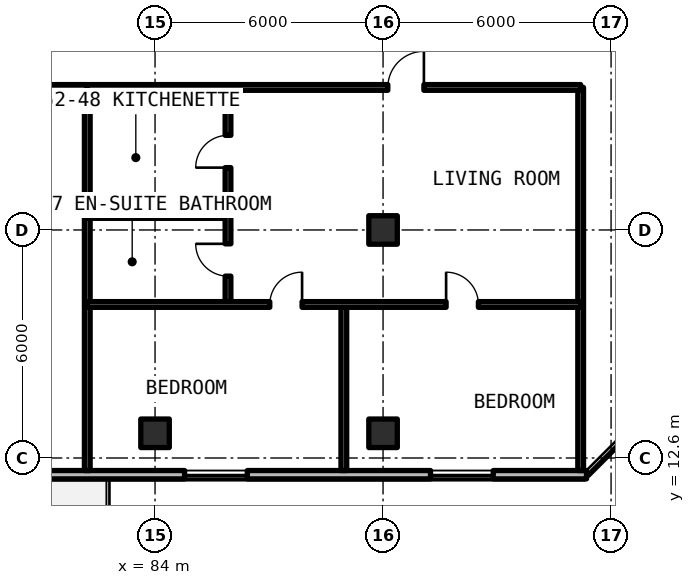
"""IFC4 building model, lengths in metres.
Left out: names, types, materials, properties, quantities, classifications, styles, units other than length and angle.
Written with IfcOpenShell. Run it as: python <this file> out.ifc"""

import sys

from ifc_helpers import new_model, si_unit, direction, frame, frame_2d, origin, origin_2d, place, context, subcontext, project, spatial, rectangle, extrude, element, fill, save


model = new_model("IFC4")
c1 = context("Model", 3, precision=1e-05, world=origin(), true_north=direction((0.0, 1.0)))
c2 = subcontext(c1, "Body", "Model", "MODEL_VIEW")
j1 = project(units=[si_unit("LENGTHUNIT", "METRE"), si_unit("PLANEANGLEUNIT", "RADIAN")], contexts=[c1])
p1 = place(None, origin())
s1 = spatial("IfcSite", under=j1, at=p1, CompositionType="ELEMENT")
p2 = place(p1, origin())
s2 = spatial("IfcBuilding", under=s1, at=p2, CompositionType="ELEMENT")
p3 = place(p2, frame((0.0, 0.0, 222.75)))
s3 = spatial("IfcBuildingStorey", under=s2, at=p3, CompositionType="ELEMENT", Elevation=222.75)
for number, where, z_axis, x_axis in (
    (1, (90.0, 18.6, 0.0), (0.0, 0.0, 1.0), (1.0, 0.0, 0.0)),
    (2, (84.0, 13.25, 0.0), (0.0, 0.0, 1.0), (1.0, 0.0, 0.0)),
    (3, (90.0, 13.25, 0.0), (0.0, 0.0, 1.0), (1.0, 0.0, 0.0)),
):
    element("IfcColumn", number, at=place(p3, frame(where, z_axis=z_axis, x_axis=x_axis)), inside=s3, PredefinedType="COLUMN", context=c2, shape_type="SweptSolid", body=[
        extrude(rectangle(XDim=0.75, YDim=0.75, at=origin_2d()), origin(), (0.0, 0.0, 1.0), 3.3),
    ])
p4 = place(p3, frame((52.11, 12.16, 0.0), z_axis=(0.0, 0.0, 1.0), x_axis=(1.0, 0.0, 0.0)))
e4 = element("IfcWall", 4, at=p4, inside=s3, PredefinedType="SOLIDWALL", context=c2, shape_type="SweptSolid", body=[
    extrude(rectangle(XDim=43.244, YDim=0.22, at=frame_2d((21.622, 0.0))), origin(), (0.0, 0.0, 1.0), 3.08),
])
p5 = place(p4, frame((15.69, 0.0, 0.0)))
e5 = element("IfcOpeningElement", 5, at=p5, cuts=e4, PredefinedType="OPENING", context=c2, shape_type="SweptSolid", body=[
    extrude(rectangle(XDim=1.1, YDim=2.15, at=frame_2d((0.55, 1.075))), frame((0.0, 0.12, 0.0), z_axis=(0.0, -1.0, 0.0), x_axis=(1.0, 0.0, 0.0)), (0.0, 0.0, 1.0), 0.24),
])
p6 = place(p4, frame((27.79, 0.0, 0.0)))
e6 = element("IfcOpeningElement", 6, at=p6, cuts=e4, PredefinedType="OPENING", context=c2, shape_type="SweptSolid", body=[
    extrude(rectangle(XDim=1.1, YDim=2.15, at=frame_2d((0.55, 1.075))), frame((0.0, 0.12, 0.0), z_axis=(0.0, -1.0, 0.0), x_axis=(1.0, 0.0, 0.0)), (0.0, 0.0, 1.0), 0.24),
])
p7 = place(p4, frame((2.726, 0.0, 0.78)))
e7 = element("IfcOpeningElement", 7, at=p7, cuts=e4, PredefinedType="OPENING", context=c2, shape_type="SweptSolid", body=[
    extrude(rectangle(XDim=1.65, YDim=1.66, at=frame_2d((0.825, 0.83))), frame((0.0, 0.12, 0.0), z_axis=(0.0, -1.0, 0.0), x_axis=(1.0, 0.0, 0.0)), (0.0, 0.0, 1.0), 0.24),
])
p8 = place(p4, frame((9.652, 0.0, 0.78)))
e8 = element("IfcOpeningElement", 8, at=p8, cuts=e4, PredefinedType="OPENING", context=c2, shape_type="SweptSolid", body=[
    extrude(rectangle(XDim=1.65, YDim=1.66, at=frame_2d((0.825, 0.83))), frame((0.0, 0.12, 0.0), z_axis=(0.0, -1.0, 0.0), x_axis=(1.0, 0.0, 0.0)), (0.0, 0.0, 1.0), 0.24),
])
p9 = place(p4, frame((32.667, 0.0, 0.78)))
e9 = element("IfcOpeningElement", 9, at=p9, cuts=e4, PredefinedType="OPENING", context=c2, shape_type="SweptSolid", body=[
    extrude(rectangle(XDim=1.65, YDim=1.66, at=frame_2d((0.825, 0.83))), frame((0.0, 0.12, 0.0), z_axis=(0.0, -1.0, 0.0), x_axis=(1.0, 0.0, 0.0)), (0.0, 0.0, 1.0), 0.24),
])
p10 = place(p4, frame((39.139, 0.0, 0.78)))
e10 = element("IfcOpeningElement", 10, at=p10, cuts=e4, PredefinedType="OPENING", context=c2, shape_type="SweptSolid", body=[
    extrude(rectangle(XDim=1.65, YDim=1.66, at=frame_2d((0.825, 0.83))), frame((0.0, 0.12, 0.0), z_axis=(0.0, -1.0, 0.0), x_axis=(1.0, 0.0, 0.0)), (0.0, 0.0, 1.0), 0.24),
])
for number, where, z_axis, x_axis in (
    (11, (95.2, 12.27, 0.0), (0.0, 0.0, 1.0), (0.0, 1.0, 0.0)),
    (12, (82.217, 12.27, 0.0), (0.0, 0.0, 1.0), (0.0, 1.0, 0.0)),
):
    element("IfcWall", number, at=place(p3, frame(where, z_axis=z_axis, x_axis=x_axis)), inside=s3, PredefinedType="SOLIDWALL", context=c2, shape_type="SweptSolid", body=[
        extrude(rectangle(XDim=10.08, YDim=0.15, at=frame_2d((5.04, 0.0))), origin(), (0.0, 0.0, 1.0), 2.35),
    ])
p11 = place(p3, frame((72.185, 22.35, 0.0), z_axis=(0.0, 0.0, 1.0), x_axis=(1.0, 0.0, 0.0)))
e13 = element("IfcWall", 13, at=p11, inside=s3, PredefinedType="SOLIDWALL", context=c2, shape_type="SweptSolid", body=[
    extrude(rectangle(XDim=10.032, YDim=0.15, at=frame_2d((5.016, 0.0))), origin(), (0.0, 0.0, 1.0), 2.35),
])
p12 = place(p11, frame((4.466, 0.0, 0.0)))
e14 = element("IfcOpeningElement", 14, at=p12, cuts=e13, PredefinedType="OPENING", context=c2, shape_type="SweptSolid", body=[
    extrude(rectangle(XDim=1.1, YDim=2.15, at=frame_2d((0.55, 1.075))), frame((0.0, 0.085, 0.0), z_axis=(0.0, -1.0, 0.0), x_axis=(1.0, 0.0, 0.0)), (0.0, 0.0, 1.0), 0.17),
])
p13 = place(p3, frame((82.217, 18.981, 0.0), z_axis=(0.0, 0.0, 1.0), x_axis=(1.0, 0.0, 0.0)))
e15 = element("IfcWall", 15, at=p13, inside=s3, PredefinedType="PARTITIONING", context=c2, shape_type="SweptSolid", body=[
    extrude(rectangle(XDim=3.703, YDim=0.15, at=frame_2d((1.852, 0.0))), origin(), (0.0, 0.0, 1.0), 2.35),
])
p14 = place(p3, frame((85.92, 16.64, 0.0), z_axis=(0.0, 0.0, 1.0), x_axis=(0.0, 1.0, 0.0)))
e16 = element("IfcWall", 16, at=p14, inside=s3, PredefinedType="PARTITIONING", context=c2, shape_type="SweptSolid", body=[
    extrude(rectangle(XDim=5.71, YDim=0.15, at=frame_2d((2.855, 0.0))), origin(), (0.0, 0.0, 1.0), 2.35),
])
p15 = place(p14, frame((0.746, 0.0, 0.0)))
e17 = element("IfcOpeningElement", 17, at=p15, cuts=e16, PredefinedType="OPENING", context=c2, shape_type="SweptSolid", body=[
    extrude(rectangle(XDim=0.85, YDim=2.1, at=frame_2d((0.425, 1.05))), frame((0.0, 0.085, 0.0), z_axis=(0.0, -1.0, 0.0), x_axis=(1.0, 0.0, 0.0)), (0.0, 0.0, 1.0), 0.17),
])
p16 = place(p14, frame((3.601, 0.0, 0.0)))
e18 = element("IfcOpeningElement", 18, at=p16, cuts=e16, PredefinedType="OPENING", context=c2, shape_type="SweptSolid", body=[
    extrude(rectangle(XDim=0.85, YDim=2.1, at=frame_2d((0.425, 1.05))), frame((0.0, 0.085, 0.0), z_axis=(0.0, -1.0, 0.0), x_axis=(1.0, 0.0, 0.0)), (0.0, 0.0, 1.0), 0.17),
])
p17 = place(p3, frame((88.968, 12.27, 0.0), z_axis=(0.0, 0.0, 1.0), x_axis=(0.0, 1.0, 0.0)))
e19 = element("IfcWall", 19, at=p17, inside=s3, PredefinedType="PARTITIONING", context=c2, shape_type="SweptSolid", body=[
    extrude(rectangle(XDim=4.37, YDim=0.15, at=frame_2d((2.185, 0.0))), origin(), (0.0, 0.0, 1.0), 2.35),
])
p18 = place(p3, frame((82.217, 16.64, 0.0), z_axis=(0.0, 0.0, 1.0), x_axis=(1.0, 0.0, 0.0)))
e20 = element("IfcWall", 20, at=p18, inside=s3, PredefinedType="PARTITIONING", context=c2, shape_type="SweptSolid", body=[
    extrude(rectangle(XDim=12.983, YDim=0.15, at=frame_2d((6.492, 0.0))), origin(), (0.0, 0.0, 1.0), 2.35),
])
p19 = place(p18, frame((4.802, 0.0, 0.0)))
e21 = element("IfcOpeningElement", 21, at=p19, cuts=e20, PredefinedType="OPENING", context=c2, shape_type="SweptSolid", body=[
    extrude(rectangle(XDim=0.85, YDim=2.1, at=frame_2d((0.425, 1.05))), frame((0.0, 0.085, 0.0), z_axis=(0.0, -1.0, 0.0), x_axis=(1.0, 0.0, 0.0)), (0.0, 0.0, 1.0), 0.17),
])
p20 = place(p18, frame((9.442, 0.0, 0.0)))
e22 = element("IfcOpeningElement", 22, at=p20, cuts=e20, PredefinedType="OPENING", context=c2, shape_type="SweptSolid", body=[
    extrude(rectangle(XDim=0.85, YDim=2.1, at=frame_2d((0.425, 1.05))), frame((0.0, 0.085, 0.0), z_axis=(0.0, -1.0, 0.0), x_axis=(1.0, 0.0, 0.0)), (0.0, 0.0, 1.0), 0.17),
])
p21 = place(p3, frame((82.217, 22.35, 0.0), z_axis=(0.0, 0.0, 1.0), x_axis=(1.0, 0.0, 0.0)))
e23 = element("IfcWall", 23, at=p21, inside=s3, PredefinedType="SOLIDWALL", context=c2, shape_type="SweptSolid", body=[
    extrude(rectangle(XDim=12.983, YDim=0.15, at=frame_2d((6.492, 0.0))), origin(), (0.0, 0.0, 1.0), 2.35),
])
p22 = place(p21, frame((7.908, 0.0, 0.0)))
e24 = element("IfcOpeningElement", 24, at=p22, cuts=e23, PredefinedType="OPENING", context=c2, shape_type="SweptSolid", body=[
    extrude(rectangle(XDim=0.95, YDim=2.15, at=frame_2d((0.475, 1.075))), frame((0.0, 0.085, 0.0), z_axis=(0.0, -1.0, 0.0), x_axis=(1.0, 0.0, 0.0)), (0.0, 0.0, 1.0), 0.17),
])
p23 = place(p9, origin())
e25 = element("IfcWindow", 25, at=p23, inside=s3, PartitioningType="SINGLE_PANEL", PredefinedType="WINDOW", context=c2, shape_type="SweptSolid", body=[
    extrude(rectangle(XDim=1.65, YDim=1.66, at=frame_2d((0.825, 0.83))), frame((0.0, 0.03, 0.0), z_axis=(0.0, -1.0, 0.0), x_axis=(1.0, 0.0, 0.0)), (0.0, 0.0, 1.0), 0.06),
])
fill(e9, e25)
p24 = place(p10, origin())
e26 = element("IfcWindow", 26, at=p24, inside=s3, PartitioningType="SINGLE_PANEL", PredefinedType="WINDOW", context=c2, shape_type="SweptSolid", body=[
    extrude(rectangle(XDim=1.65, YDim=1.66, at=frame_2d((0.825, 0.83))), frame((0.0, 0.03, 0.0), z_axis=(0.0, -1.0, 0.0), x_axis=(1.0, 0.0, 0.0)), (0.0, 0.0, 1.0), 0.06),
])
fill(e10, e26)
p25 = place(p15, origin())
e27 = element("IfcDoor", 27, at=p25, inside=s3, OperationType="SINGLE_SWING_RIGHT", PredefinedType="DOOR", context=c2, shape_type="SweptSolid", body=[
    extrude(rectangle(XDim=0.85, YDim=2.1, at=frame_2d((0.425, 1.05))), frame((0.0, 0.025, 0.0), z_axis=(0.0, -1.0, 0.0), x_axis=(1.0, 0.0, 0.0)), (0.0, 0.0, 1.0), 0.05),
])
fill(e17, e27)
p26 = place(p16, origin())
e28 = element("IfcDoor", 28, at=p26, inside=s3, OperationType="SINGLE_SWING_LEFT", PredefinedType="DOOR", context=c2, shape_type="SweptSolid", body=[
    extrude(rectangle(XDim=0.85, YDim=2.1, at=frame_2d((0.425, 1.05))), frame((0.0, 0.025, 0.0), z_axis=(0.0, -1.0, 0.0), x_axis=(1.0, 0.0, 0.0)), (0.0, 0.0, 1.0), 0.05),
])
fill(e18, e28)
p27 = place(p19, origin())
e29 = element("IfcDoor", 29, at=p27, inside=s3, OperationType="SINGLE_SWING_RIGHT", PredefinedType="DOOR", context=c2, shape_type="SweptSolid", body=[
    extrude(rectangle(XDim=0.85, YDim=2.1, at=frame_2d((0.425, 1.05))), frame((0.0, 0.025, 0.0), z_axis=(0.0, -1.0, 0.0), x_axis=(1.0, 0.0, 0.0)), (0.0, 0.0, 1.0), 0.05),
])
fill(e21, e29)
p28 = place(p20, origin())
e30 = element("IfcDoor", 30, at=p28, inside=s3, OperationType="SINGLE_SWING_LEFT", PredefinedType="DOOR", context=c2, shape_type="SweptSolid", body=[
    extrude(rectangle(XDim=0.85, YDim=2.1, at=frame_2d((0.425, 1.05))), frame((0.0, 0.025, 0.0), z_axis=(0.0, -1.0, 0.0), x_axis=(1.0, 0.0, 0.0)), (0.0, 0.0, 1.0), 0.05),
])
fill(e22, e30)
p29 = place(p22, origin())
e31 = element("IfcDoor", 31, at=p29, inside=s3, OperationType="SINGLE_SWING_RIGHT", PredefinedType="DOOR", context=c2, shape_type="SweptSolid", body=[
    extrude(rectangle(XDim=0.95, YDim=2.15, at=frame_2d((0.475, 1.075))), frame((0.0, 0.025, 0.0), z_axis=(0.0, -1.0, 0.0), x_axis=(1.0, 0.0, 0.0)), (0.0, 0.0, 1.0), 0.05),
])
fill(e24, e31)
save(model, sys.argv[1])
